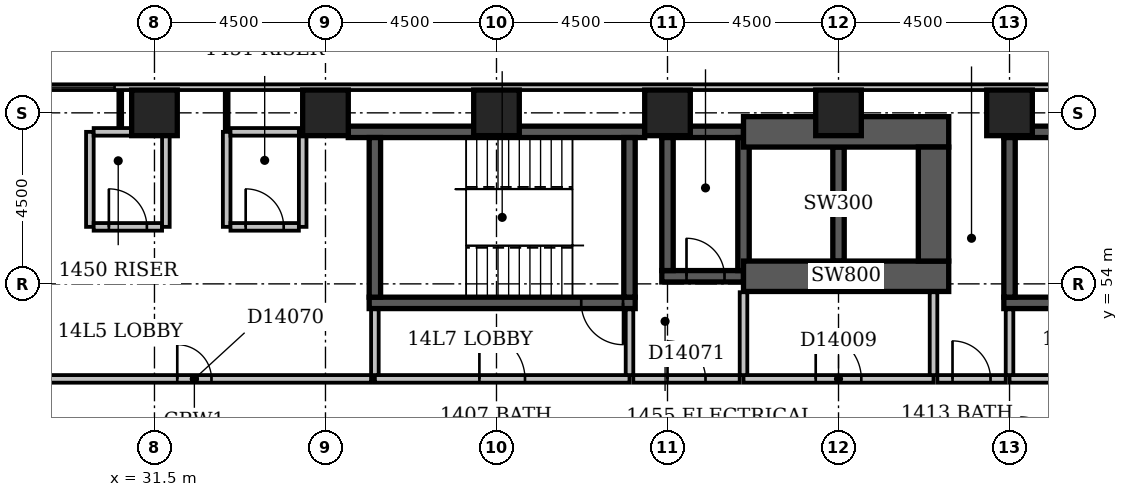
"""IFC4 building model, lengths in metres.
Left out: names, types, materials, properties, quantities, classifications, styles, units other than length and angle.
Written with IfcOpenShell. Run it as: python <this file> out.ifc"""

import sys

from ifc_helpers import new_model, si_unit, direction, frame, frame_2d, origin, origin_2d, place, context, subcontext, project, spatial, rectangle, extrude, element, fill, save


model = new_model("IFC4")
c1 = context("Model", 3, precision=1e-05, world=origin(), true_north=direction((0.0, 1.0)))
c2 = subcontext(c1, "Body", "Model", "MODEL_VIEW")
j1 = project(units=[si_unit("LENGTHUNIT", "METRE"), si_unit("PLANEANGLEUNIT", "RADIAN")], contexts=[c1])
p1 = place(None, origin())
s1 = spatial("IfcSite", under=j1, at=p1, CompositionType="ELEMENT")
p2 = place(p1, origin())
s2 = spatial("IfcBuilding", under=s1, at=p2, CompositionType="ELEMENT")
p3 = place(p2, frame((0.0, 0.0, 61.4)))
s3 = spatial("IfcBuildingStorey", under=s2, at=p3, CompositionType="ELEMENT", Elevation=61.4)
p4 = place(p3, frame((36.6, 58.0, -0.3), z_axis=(0.0, 0.0, 1.0), x_axis=(1.0, 0.0, 0.0)))
e1 = element("IfcWall", 1, at=p4, inside=s3, PredefinedType="SHEAR", context=c2, shape_type="SweptSolid", body=[
    extrude(rectangle(XDim=7.8, YDim=0.3, at=frame_2d((3.9, 0.0))), origin(), (0.0, 0.0, 1.0), 3.6),
])
p5 = place(p3, frame((37.15, 53.5, -0.3), z_axis=(0.0, 0.0, 1.0), x_axis=(1.0, 0.0, 0.0)))
e2 = element("IfcWall", 2, at=p5, inside=s3, PredefinedType="SHEAR", context=c2, shape_type="SweptSolid", body=[
    extrude(rectangle(XDim=7.0, YDim=0.3, at=frame_2d((3.5, 0.0))), origin(), (0.0, 0.0, 1.0), 3.6),
])
p6 = place(p5, frame((5.58, 0.0, 0.3)))
e3 = element("IfcOpeningElement", 3, at=p6, cuts=e2, PredefinedType="OPENING", context=c2, shape_type="SweptSolid", body=[
    extrude(rectangle(XDim=1.1, YDim=2.1, at=frame_2d((0.55, 1.05))), frame((0.0, 0.162, 0.0), z_axis=(0.0, -1.0, 0.0), x_axis=(1.0, 0.0, 0.0)), (0.0, 0.0, 1.0), 0.324),
])
for number, where, z_axis, x_axis in (
    (4, (37.3, 53.65, -0.3), (0.0, 0.0, 1.0), (0.0, 1.0, 0.0)),
    (5, (44.0, 53.65, -0.3), (0.0, 0.0, 1.0), (0.0, 1.0, 0.0)),
):
    element("IfcWall", number, at=place(p3, frame(where, z_axis=z_axis, x_axis=x_axis)), inside=s3, PredefinedType="SHEAR", context=c2, shape_type="SweptSolid", body=[
        extrude(rectangle(XDim=4.2, YDim=0.3, at=frame_2d((2.1, 0.0))), origin(), (0.0, 0.0, 1.0), 3.6),
    ])
p7 = place(p3, frame((44.85, 54.2, -0.3), z_axis=(0.0, 0.0, 1.0), x_axis=(1.0, 0.0, 0.0)))
e6 = element("IfcWall", 6, at=p7, inside=s3, PredefinedType="SHEAR", context=c2, shape_type="SweptSolid", body=[
    extrude(rectangle(XDim=2.15, YDim=0.3, at=frame_2d((1.075, 0.0))), origin(), (0.0, 0.0, 1.0), 3.6),
])
p8 = place(p7, frame((0.65, 0.0, 0.3)))
e7 = element("IfcOpeningElement", 7, at=p8, cuts=e6, PredefinedType="OPENING", context=c2, shape_type="SweptSolid", body=[
    extrude(rectangle(XDim=1.0, YDim=2.1, at=frame_2d((0.5, 1.05))), frame((0.0, 0.162, 0.0), z_axis=(0.0, -1.0, 0.0), x_axis=(1.0, 0.0, 0.0)), (0.0, 0.0, 1.0), 0.324),
])
p9 = place(p3, frame((44.85, 58.0, -0.3), z_axis=(0.0, 0.0, 1.0), x_axis=(1.0, 0.0, 0.0)))
e8 = element("IfcWall", 8, at=p9, inside=s3, PredefinedType="SHEAR", context=c2, shape_type="SweptSolid", body=[
    extrude(rectangle(XDim=2.15, YDim=0.3, at=frame_2d((1.075, 0.0))), origin(), (0.0, 0.0, 1.0), 3.6),
])
p10 = place(p3, frame((45.0, 54.35, -0.3), z_axis=(0.0, 0.0, 1.0), x_axis=(0.0, 1.0, 0.0)))
e9 = element("IfcWall", 9, at=p10, inside=s3, PredefinedType="SHEAR", context=c2, shape_type="SweptSolid", body=[
    extrude(rectangle(XDim=3.5, YDim=0.3, at=frame_2d((1.75, 0.0))), origin(), (0.0, 0.0, 1.0), 3.6),
])
p11 = place(p3, frame((47.0, 54.2, -0.3), z_axis=(0.0, 0.0, 1.0), x_axis=(1.0, 0.0, 0.0)))
e10 = element("IfcWall", 10, at=p11, inside=s3, PredefinedType="SHEAR", context=c2, shape_type="SweptSolid", body=[
    extrude(rectangle(XDim=5.4, YDim=0.8, at=frame_2d((2.7, 0.0))), origin(), (0.0, 0.0, 1.0), 3.6),
])
p12 = place(p3, frame((47.0, 54.35, -0.3), z_axis=(0.0, 0.0, 1.0), x_axis=(0.0, 1.0, 0.0)))
e11 = element("IfcWall", 11, at=p12, inside=s3, PredefinedType="SHEAR", context=c2, shape_type="SweptSolid", body=[
    extrude(rectangle(XDim=3.5, YDim=0.3, at=frame_2d((1.75, 0.0))), origin(), (0.0, 0.0, 1.0), 3.6),
])
p13 = place(p3, frame((47.0, 58.0, -0.3), z_axis=(0.0, 0.0, 1.0), x_axis=(1.0, 0.0, 0.0)))
e12 = element("IfcWall", 12, at=p13, inside=s3, PredefinedType="SHEAR", context=c2, shape_type="SweptSolid", body=[
    extrude(rectangle(XDim=5.4, YDim=0.8, at=frame_2d((2.7, 0.0))), origin(), (0.0, 0.0, 1.0), 3.6),
])
p14 = place(p3, frame((49.5, 54.6, -0.3), z_axis=(0.0, 0.0, 1.0), x_axis=(0.0, 1.0, 0.0)))
e13 = element("IfcWall", 13, at=p14, inside=s3, PredefinedType="SHEAR", context=c2, shape_type="SweptSolid", body=[
    extrude(rectangle(XDim=3.0, YDim=0.3, at=frame_2d((1.5, 0.0))), origin(), (0.0, 0.0, 1.0), 3.6),
])
p15 = place(p3, frame((52.0, 54.6, -0.3), z_axis=(0.0, 0.0, 1.0), x_axis=(0.0, 1.0, 0.0)))
e14 = element("IfcWall", 14, at=p15, inside=s3, PredefinedType="SHEAR", context=c2, shape_type="SweptSolid", body=[
    extrude(rectangle(XDim=3.0, YDim=0.8, at=frame_2d((1.5, 0.0))), origin(), (0.0, 0.0, 1.0), 3.6),
])
p16 = place(p3, frame((53.85, 53.5, -0.3), z_axis=(0.0, 0.0, 1.0), x_axis=(1.0, 0.0, 0.0)))
e15 = element("IfcWall", 15, at=p16, inside=s3, PredefinedType="SHEAR", context=c2, shape_type="SweptSolid", body=[
    extrude(rectangle(XDim=7.0, YDim=0.3, at=frame_2d((3.5, 0.0))), origin(), (0.0, 0.0, 1.0), 3.6),
])
p17 = place(p16, frame((5.58, 0.0, 0.3)))
e16 = element("IfcOpeningElement", 16, at=p17, cuts=e15, PredefinedType="OPENING", context=c2, shape_type="SweptSolid", body=[
    extrude(rectangle(XDim=1.1, YDim=2.1, at=frame_2d((0.55, 1.05))), frame((0.0, 0.162, 0.0), z_axis=(0.0, -1.0, 0.0), x_axis=(1.0, 0.0, 0.0)), (0.0, 0.0, 1.0), 0.324),
])
p18 = place(p3, frame((53.85, 58.0, -0.3), z_axis=(0.0, 0.0, 1.0), x_axis=(1.0, 0.0, 0.0)))
e17 = element("IfcWall", 17, at=p18, inside=s3, PredefinedType="SHEAR", context=c2, shape_type="SweptSolid", body=[
    extrude(rectangle(XDim=7.0, YDim=0.3, at=frame_2d((3.5, 0.0))), origin(), (0.0, 0.0, 1.0), 3.6),
])
p19 = place(p3, frame((54.0, 53.65, -0.3), z_axis=(0.0, 0.0, 1.0), x_axis=(0.0, 1.0, 0.0)))
e18 = element("IfcWall", 18, at=p19, inside=s3, PredefinedType="SHEAR", context=c2, shape_type="SweptSolid", body=[
    extrude(rectangle(XDim=4.2, YDim=0.3, at=frame_2d((2.1, 0.0))), origin(), (0.0, 0.0, 1.0), 3.6),
])
for number, where, z_axis, x_axis in (
    (19, (31.5, 58.5, -0.3), (0.0, 0.0, 1.0), (1.0, 0.0, 0.0)),
    (20, (36.0, 58.5, -0.3), (0.0, 0.0, 1.0), (1.0, 0.0, 0.0)),
    (21, (40.5, 58.5, -0.3), (0.0, 0.0, 1.0), (1.0, 0.0, 0.0)),
    (22, (45.0, 58.5, -0.3), (0.0, 0.0, 1.0), (1.0, 0.0, 0.0)),
    (23, (49.5, 58.5, -0.3), (0.0, 0.0, 1.0), (1.0, 0.0, 0.0)),
    (24, (54.0, 58.5, -0.3), (0.0, 0.0, 1.0), (1.0, 0.0, 0.0)),
):
    element("IfcColumn", number, at=place(p3, frame(where, z_axis=z_axis, x_axis=x_axis)), inside=s3, PredefinedType="COLUMN", context=c2, shape_type="SweptSolid", body=[
        extrude(rectangle(XDim=1.2, YDim=1.2, at=origin_2d()), origin(), (0.0, 0.0, 1.0), 3.6),
    ])
p20 = place(p3, frame((68.1, 59.175, 0.0), z_axis=(0.0, 0.0, 1.0), x_axis=(-1.0, 0.0, 0.0)))
e25 = element("IfcWall", 25, at=p20, inside=s3, PredefinedType="STANDARD", context=c2, shape_type="SweptSolid", body=[
    extrude(rectangle(XDim=68.85, YDim=0.15, at=frame_2d((34.425, 0.0))), origin(), (0.0, 0.0, 1.0), 2.7),
])
p21 = place(p20, frame((37.65, 0.0, 0.6)))
e26 = element("IfcOpeningElement", 26, at=p21, cuts=e25, PredefinedType="OPENING", context=c2, shape_type="SweptSolid", body=[
    extrude(rectangle(XDim=2.4, YDim=1.8, at=frame_2d((1.2, 0.9))), frame((0.0, 0.087, 0.0), z_axis=(0.0, -1.0, 0.0), x_axis=(1.0, 0.0, 0.0)), (0.0, 0.0, 1.0), 0.174),
])
p22 = place(p3, frame((47.0, 51.5, 0.0), z_axis=(0.0, 0.0, 1.0), x_axis=(1.0, 0.0, 0.0)))
e27 = element("IfcWall", 27, at=p22, inside=s3, PredefinedType="PARTITIONING", context=c2, shape_type="SweptSolid", body=[
    extrude(rectangle(XDim=5.0, YDim=0.2, at=frame_2d((2.5, 0.0))), origin(), (0.0, 0.0, 1.0), 3.3),
])
p23 = place(p22, frame((1.9, 0.0, 0.0)))
e28 = element("IfcOpeningElement", 28, at=p23, cuts=e27, PredefinedType="OPENING", context=c2, shape_type="SweptSolid", body=[
    extrude(rectangle(XDim=1.2, YDim=2.1, at=frame_2d((0.6, 1.05))), frame((0.0, 0.112, 0.0), z_axis=(0.0, -1.0, 0.0), x_axis=(1.0, 0.0, 0.0)), (0.0, 0.0, 1.0), 0.224),
])
for number, where, z_axis, x_axis in (
    (29, (52.0, 51.6, 0.0), (0.0, 0.0, 1.0), (0.0, 1.0, 0.0)),
    (30, (47.0, 51.6, 0.0), (0.0, 0.0, 1.0), (0.0, 1.0, 0.0)),
):
    element("IfcWall", number, at=place(p3, frame(where, z_axis=z_axis, x_axis=x_axis)), inside=s3, PredefinedType="PARTITIONING", context=c2, shape_type="SweptSolid", body=[
        extrude(rectangle(XDim=2.18, YDim=0.2, at=frame_2d((1.09, 0.0))), origin(), (0.0, 0.0, 1.0), 3.3),
    ])
p24 = place(p3, frame((37.3, 51.5, 0.0), z_axis=(0.0, 0.0, 1.0), x_axis=(1.0, 0.0, 0.0)))
e31 = element("IfcWall", 31, at=p24, inside=s3, PredefinedType="PARTITIONING", context=c2, shape_type="SweptSolid", body=[
    extrude(rectangle(XDim=6.7, YDim=0.2, at=frame_2d((3.35, 0.0))), origin(), (0.0, 0.0, 1.0), 3.3),
])
p25 = place(p24, frame((2.75, 0.0, 0.0)))
e32 = element("IfcOpeningElement", 32, at=p25, cuts=e31, PredefinedType="OPENING", context=c2, shape_type="SweptSolid", body=[
    extrude(rectangle(XDim=1.2, YDim=2.1, at=frame_2d((0.6, 1.05))), frame((0.0, 0.112, 0.0), z_axis=(0.0, -1.0, 0.0), x_axis=(1.0, 0.0, 0.0)), (0.0, 0.0, 1.0), 0.224),
])
for number, where, z_axis, x_axis in (
    (33, (44.0, 51.6, 0.0), (0.0, 0.0, 1.0), (0.0, 1.0, 0.0)),
    (34, (37.3, 51.6, 0.0), (0.0, 0.0, 1.0), (0.0, 1.0, 0.0)),
):
    element("IfcWall", number, at=place(p3, frame(where, z_axis=z_axis, x_axis=x_axis)), inside=s3, PredefinedType="PARTITIONING", context=c2, shape_type="SweptSolid", body=[
        extrude(rectangle(XDim=1.73, YDim=0.2, at=frame_2d((0.865, 0.0))), origin(), (0.0, 0.0, 1.0), 3.3),
    ])
p26 = place(p3, frame((54.0, 51.5, 0.0), z_axis=(0.0, 0.0, 1.0), x_axis=(1.0, 0.0, 0.0)))
e35 = element("IfcWall", 35, at=p26, inside=s3, PredefinedType="PARTITIONING", context=c2, shape_type="SweptSolid", body=[
    extrude(rectangle(XDim=6.7, YDim=0.2, at=frame_2d((3.35, 0.0))), origin(), (0.0, 0.0, 1.0), 3.3),
])
p27 = place(p26, frame((2.75, 0.0, 0.0)))
e36 = element("IfcOpeningElement", 36, at=p27, cuts=e35, PredefinedType="OPENING", context=c2, shape_type="SweptSolid", body=[
    extrude(rectangle(XDim=1.2, YDim=2.1, at=frame_2d((0.6, 1.05))), frame((0.0, 0.112, 0.0), z_axis=(0.0, -1.0, 0.0), x_axis=(1.0, 0.0, 0.0)), (0.0, 0.0, 1.0), 0.224),
])
p28 = place(p3, frame((54.0, 51.6, 0.0), z_axis=(0.0, 0.0, 1.0), x_axis=(0.0, 1.0, 0.0)))
e37 = element("IfcWall", 37, at=p28, inside=s3, PredefinedType="PARTITIONING", context=c2, shape_type="SweptSolid", body=[
    extrude(rectangle(XDim=1.73, YDim=0.2, at=frame_2d((0.865, 0.0))), origin(), (0.0, 0.0, 1.0), 2.6),
])
p29 = place(p3, frame((27.9, 51.5, 0.0), z_axis=(0.0, 0.0, 1.0), x_axis=(1.0, 0.0, 0.0)))
e38 = element("IfcWall", 38, at=p29, inside=s3, PredefinedType="PARTITIONING", context=c2, shape_type="SweptSolid", body=[
    extrude(rectangle(XDim=9.3, YDim=0.2, at=frame_2d((4.65, 0.0))), origin(), (0.0, 0.0, 1.0), 3.3),
])
p30 = place(p29, frame((4.2, 0.0, 0.0)))
e39 = element("IfcOpeningElement", 39, at=p30, cuts=e38, PredefinedType="OPENING", context=c2, shape_type="SweptSolid", body=[
    extrude(rectangle(XDim=0.9, YDim=2.1, at=frame_2d((0.45, 1.05))), frame((0.0, 0.112, 0.0), z_axis=(0.0, -1.0, 0.0), x_axis=(1.0, 0.0, 0.0)), (0.0, 0.0, 1.0), 0.224),
])
p31 = place(p3, frame((44.1, 51.5, 0.0), z_axis=(0.0, 0.0, 1.0), x_axis=(1.0, 0.0, 0.0)))
e40 = element("IfcWall", 40, at=p31, inside=s3, PredefinedType="PARTITIONING", context=c2, shape_type="SweptSolid", body=[
    extrude(rectangle(XDim=2.8, YDim=0.2, at=frame_2d((1.4, 0.0))), origin(), (0.0, 0.0, 1.0), 3.3),
])
p32 = place(p31, frame((0.9, 0.0, 0.0)))
e41 = element("IfcOpeningElement", 41, at=p32, cuts=e40, PredefinedType="OPENING", context=c2, shape_type="SweptSolid", body=[
    extrude(rectangle(XDim=1.0, YDim=2.1, at=frame_2d((0.5, 1.05))), frame((0.0, 0.112, 0.0), z_axis=(0.0, -1.0, 0.0), x_axis=(1.0, 0.0, 0.0)), (0.0, 0.0, 1.0), 0.224),
])
p33 = place(p3, frame((52.1, 51.5, 0.0), z_axis=(0.0, 0.0, 1.0), x_axis=(1.0, 0.0, 0.0)))
e42 = element("IfcWall", 42, at=p33, inside=s3, PredefinedType="PARTITIONING", context=c2, shape_type="SweptSolid", body=[
    extrude(rectangle(XDim=1.8, YDim=0.2, at=frame_2d((0.9, 0.0))), origin(), (0.0, 0.0, 1.0), 3.3),
])
p34 = place(p33, frame((0.4, 0.0, 0.0)))
e43 = element("IfcOpeningElement", 43, at=p34, cuts=e42, PredefinedType="OPENING", context=c2, shape_type="SweptSolid", body=[
    extrude(rectangle(XDim=1.0, YDim=2.1, at=frame_2d((0.5, 1.05))), frame((0.0, 0.112, 0.0), z_axis=(0.0, -1.0, 0.0), x_axis=(1.0, 0.0, 0.0)), (0.0, 0.0, 1.0), 0.224),
])
p35 = place(p3, frame((29.8, 55.5, 0.0), z_axis=(0.0, 0.0, 1.0), x_axis=(0.0, 1.0, 0.0)))
e44 = element("IfcWall", 44, at=p35, inside=s3, PredefinedType="PARTITIONING", context=c2, shape_type="SweptSolid", body=[
    extrude(rectangle(XDim=2.5, YDim=0.2, at=frame_2d((1.25, 0.0))), origin(), (0.0, 0.0, 1.0), 3.3),
])
p36 = place(p3, frame((29.9, 55.5, 0.0), z_axis=(0.0, 0.0, 1.0), x_axis=(1.0, 0.0, 0.0)))
e45 = element("IfcWall", 45, at=p36, inside=s3, PredefinedType="PARTITIONING", context=c2, shape_type="SweptSolid", body=[
    extrude(rectangle(XDim=1.8, YDim=0.2, at=frame_2d((0.9, 0.0))), origin(), (0.0, 0.0, 1.0), 3.3),
])
p37 = place(p36, frame((0.4, 0.0, 0.0)))
e46 = element("IfcOpeningElement", 46, at=p37, cuts=e45, PredefinedType="OPENING", context=c2, shape_type="SweptSolid", body=[
    extrude(rectangle(XDim=1.0, YDim=2.1, at=frame_2d((0.5, 1.05))), frame((0.0, 0.112, 0.0), z_axis=(0.0, -1.0, 0.0), x_axis=(1.0, 0.0, 0.0)), (0.0, 0.0, 1.0), 0.224),
])
for number, where, z_axis, x_axis in (
    (47, (31.8, 55.5, 0.0), (0.0, 0.0, 1.0), (0.0, 1.0, 0.0)),
    (48, (33.4, 55.5, 0.0), (0.0, 0.0, 1.0), (0.0, 1.0, 0.0)),
):
    element("IfcWall", number, at=place(p3, frame(where, z_axis=z_axis, x_axis=x_axis)), inside=s3, PredefinedType="PARTITIONING", context=c2, shape_type="SweptSolid", body=[
        extrude(rectangle(XDim=2.5, YDim=0.2, at=frame_2d((1.25, 0.0))), origin(), (0.0, 0.0, 1.0), 3.3),
    ])
p38 = place(p3, frame((33.5, 55.5, 0.0), z_axis=(0.0, 0.0, 1.0), x_axis=(1.0, 0.0, 0.0)))
e49 = element("IfcWall", 49, at=p38, inside=s3, PredefinedType="PARTITIONING", context=c2, shape_type="SweptSolid", body=[
    extrude(rectangle(XDim=1.8, YDim=0.2, at=frame_2d((0.9, 0.0))), origin(), (0.0, 0.0, 1.0), 3.3),
])
p39 = place(p38, frame((0.4, 0.0, 0.0)))
e50 = element("IfcOpeningElement", 50, at=p39, cuts=e49, PredefinedType="OPENING", context=c2, shape_type="SweptSolid", body=[
    extrude(rectangle(XDim=1.0, YDim=2.1, at=frame_2d((0.5, 1.05))), frame((0.0, 0.112, 0.0), z_axis=(0.0, -1.0, 0.0), x_axis=(1.0, 0.0, 0.0)), (0.0, 0.0, 1.0), 0.224),
])
p40 = place(p3, frame((35.4, 55.5, 0.0), z_axis=(0.0, 0.0, 1.0), x_axis=(0.0, 1.0, 0.0)))
e51 = element("IfcWall", 51, at=p40, inside=s3, PredefinedType="PARTITIONING", context=c2, shape_type="SweptSolid", body=[
    extrude(rectangle(XDim=2.5, YDim=0.2, at=frame_2d((1.25, 0.0))), origin(), (0.0, 0.0, 1.0), 2.4),
])
p41 = place(p3, frame((29.9, 58.0, 0.0), z_axis=(0.0, 0.0, 1.0), x_axis=(1.0, 0.0, 0.0)))
e52 = element("IfcWall", 52, at=p41, inside=s3, PredefinedType="PARTITIONING", context=c2, shape_type="SweptSolid", body=[
    extrude(rectangle(XDim=1.8, YDim=0.2, at=frame_2d((0.9, 0.0))), origin(), (0.0, 0.0, 1.0), 3.3),
])
p42 = place(p3, frame((33.4, 58.0, 0.0), z_axis=(0.0, 0.0, 1.0), x_axis=(0.0, 1.0, 0.0)))
e53 = element("IfcWall", 53, at=p42, inside=s3, PredefinedType="PARTITIONING", context=c2, shape_type="SweptSolid", body=[
    extrude(rectangle(XDim=1.1, YDim=0.1, at=frame_2d((0.55, 0.0))), origin(), (0.0, 0.0, 1.0), 3.3),
])
p43 = place(p3, frame((33.5, 58.0, 0.0), z_axis=(0.0, 0.0, 1.0), x_axis=(1.0, 0.0, 0.0)))
e54 = element("IfcWall", 54, at=p43, inside=s3, PredefinedType="PARTITIONING", context=c2, shape_type="SweptSolid", body=[
    extrude(rectangle(XDim=1.8, YDim=0.2, at=frame_2d((0.9, 0.0))), origin(), (0.0, 0.0, 1.0), 3.3),
])
p44 = place(p3, frame((30.6, 58.1, 0.0), z_axis=(0.0, 0.0, 1.0), x_axis=(0.0, 1.0, 0.0)))
e55 = element("IfcWall", 55, at=p44, inside=s3, PredefinedType="PARTITIONING", context=c2, shape_type="SweptSolid", body=[
    extrude(rectangle(XDim=1.0, YDim=0.1, at=frame_2d((0.5, 0.0))), origin(), (0.0, 0.0, 1.0), 3.3),
])
p45 = place(p21, origin())
e56 = element("IfcWindow", 56, at=p45, inside=s3, PartitioningType="SINGLE_PANEL", PredefinedType="WINDOW", context=c2, shape_type="SweptSolid", body=[
    extrude(rectangle(XDim=2.4, YDim=1.8, at=frame_2d((1.2, 0.9))), frame((0.0, 0.03, 0.0), z_axis=(0.0, -1.0, 0.0), x_axis=(1.0, 0.0, 0.0)), (0.0, 0.0, 1.0), 0.06),
])
fill(e26, e56)
p46 = place(p25, origin())
e57 = element("IfcDoor", 57, at=p46, inside=s3, OperationType="SINGLE_SWING_LEFT", PredefinedType="DOOR", context=c2, shape_type="SweptSolid", body=[
    extrude(rectangle(XDim=1.2, YDim=2.1, at=frame_2d((0.6, 1.05))), frame((0.0, 0.025, 0.0), z_axis=(0.0, -1.0, 0.0), x_axis=(1.0, 0.0, 0.0)), (0.0, 0.0, 1.0), 0.05),
])
fill(e32, e57)
p47 = place(p23, origin())
e58 = element("IfcDoor", 58, at=p47, inside=s3, OperationType="SINGLE_SWING_LEFT", PredefinedType="DOOR", context=c2, shape_type="SweptSolid", body=[
    extrude(rectangle(XDim=1.2, YDim=2.1, at=frame_2d((0.6, 1.05))), frame((0.0, 0.025, 0.0), z_axis=(0.0, -1.0, 0.0), x_axis=(1.0, 0.0, 0.0)), (0.0, 0.0, 1.0), 0.05),
])
fill(e28, e58)
p48 = place(p8, origin())
e59 = element("IfcDoor", 59, at=p48, inside=s3, OperationType="SINGLE_SWING_LEFT", PredefinedType="DOOR", context=c2, shape_type="SweptSolid", body=[
    extrude(rectangle(XDim=1.0, YDim=2.1, at=frame_2d((0.5, 1.05))), frame((0.0, 0.025, 0.0), z_axis=(0.0, -1.0, 0.0), x_axis=(1.0, 0.0, 0.0)), (0.0, 0.0, 1.0), 0.05),
])
fill(e7, e59)
p49 = place(p6, origin())
e60 = element("IfcDoor", 60, at=p49, inside=s3, OperationType="SINGLE_SWING_RIGHT", PredefinedType="DOOR", context=c2, shape_type="SweptSolid", body=[
    extrude(rectangle(XDim=1.1, YDim=2.1, at=frame_2d((0.55, 1.05))), frame((0.0, 0.025, 0.0), z_axis=(0.0, -1.0, 0.0), x_axis=(1.0, 0.0, 0.0)), (0.0, 0.0, 1.0), 0.05),
])
fill(e3, e60)
p50 = place(p30, origin())
e61 = element("IfcDoor", 61, at=p50, inside=s3, OperationType="SINGLE_SWING_LEFT", PredefinedType="DOOR", context=c2, shape_type="SweptSolid", body=[
    extrude(rectangle(XDim=0.9, YDim=2.1, at=frame_2d((0.45, 1.05))), frame((0.0, 0.025, 0.0), z_axis=(0.0, -1.0, 0.0), x_axis=(1.0, 0.0, 0.0)), (0.0, 0.0, 1.0), 0.05),
])
fill(e39, e61)
p51 = place(p32, origin())
e62 = element("IfcDoor", 62, at=p51, inside=s3, OperationType="SINGLE_SWING_LEFT", PredefinedType="DOOR", context=c2, shape_type="SweptSolid", body=[
    extrude(rectangle(XDim=1.0, YDim=2.1, at=frame_2d((0.5, 1.05))), frame((0.0, 0.025, 0.0), z_axis=(0.0, -1.0, 0.0), x_axis=(1.0, 0.0, 0.0)), (0.0, 0.0, 1.0), 0.05),
])
fill(e41, e62)
p52 = place(p34, origin())
e63 = element("IfcDoor", 63, at=p52, inside=s3, OperationType="SINGLE_SWING_LEFT", PredefinedType="DOOR", context=c2, shape_type="SweptSolid", body=[
    extrude(rectangle(XDim=1.0, YDim=2.1, at=frame_2d((0.5, 1.05))), frame((0.0, 0.025, 0.0), z_axis=(0.0, -1.0, 0.0), x_axis=(1.0, 0.0, 0.0)), (0.0, 0.0, 1.0), 0.05),
])
fill(e43, e63)
p53 = place(p37, origin())
e64 = element("IfcDoor", 64, at=p53, inside=s3, OperationType="SINGLE_SWING_LEFT", PredefinedType="DOOR", context=c2, shape_type="SweptSolid", body=[
    extrude(rectangle(XDim=1.0, YDim=2.1, at=frame_2d((0.5, 1.05))), frame((0.0, 0.025, 0.0), z_axis=(0.0, -1.0, 0.0), x_axis=(1.0, 0.0, 0.0)), (0.0, 0.0, 1.0), 0.05),
])
fill(e46, e64)
p54 = place(p39, origin())
e65 = element("IfcDoor", 65, at=p54, inside=s3, OperationType="SINGLE_SWING_LEFT", PredefinedType="DOOR", context=c2, shape_type="SweptSolid", body=[
    extrude(rectangle(XDim=1.0, YDim=2.1, at=frame_2d((0.5, 1.05))), frame((0.0, 0.025, 0.0), z_axis=(0.0, -1.0, 0.0), x_axis=(1.0, 0.0, 0.0)), (0.0, 0.0, 1.0), 0.05),
])
fill(e50, e65)
save(model, sys.argv[1])
